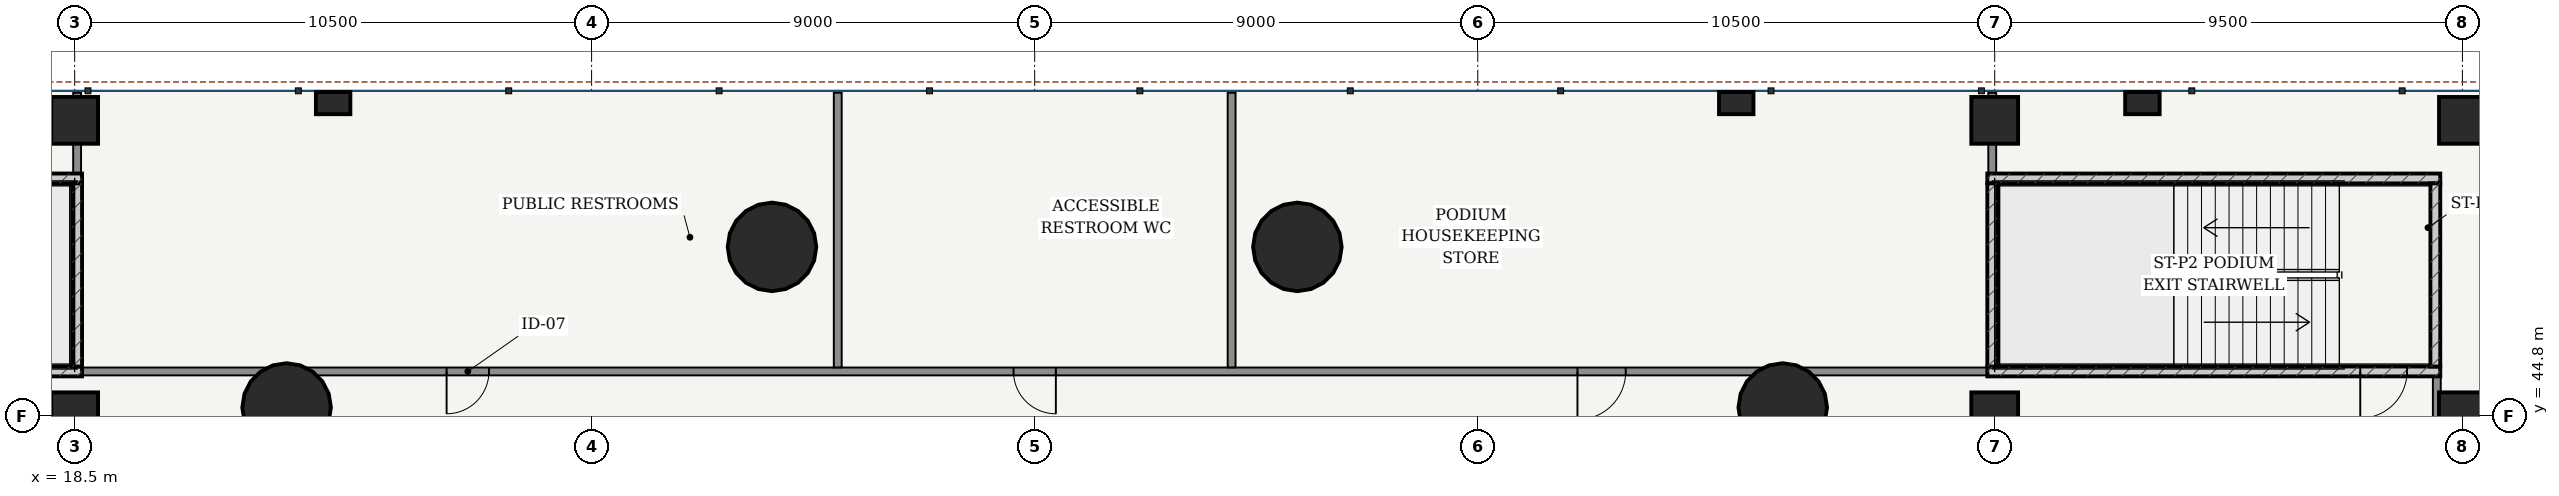
"""IFC4 building model, lengths in metres.
Left out: names, types, materials, properties, quantities, classifications, styles, units other than length and angle.
Written with IfcOpenShell. Run it as: python <this file> out.ifc"""

import sys

from ifc_helpers import new_model, si_unit, direction, frame, frame_2d, origin, origin_2d, place, context, subcontext, project, spatial, rectangle, hollow_circle, extrude, source, transform, mapped, element, fill, save


model = new_model("IFC4")
c1 = context("Model", 3, precision=1e-05, world=origin(), true_north=direction((-0.2419218956, 0.970295726276)))
c2 = subcontext(c1, "Body", "Model", "MODEL_VIEW")
j1 = project(units=[si_unit("LENGTHUNIT", "METRE"), si_unit("PLANEANGLEUNIT", "RADIAN")], contexts=[c1])
p1 = place(None, origin())
s1 = spatial("IfcSite", under=j1, at=p1, CompositionType="ELEMENT")
p2 = place(p1, origin())
s2 = spatial("IfcBuilding", under=s1, at=p2, CompositionType="ELEMENT")
p3 = place(p2, frame((0.0, 0.0, 5.4)))
s3 = spatial("IfcBuildingStorey", under=s2, at=p3, CompositionType="ELEMENT", Elevation=5.4)
p4 = place(p3, frame((9.45, 45.7, 0.0), z_axis=(0.0, 0.0, 1.0), x_axis=(1.0, 0.0, 0.0)))
e1 = element("IfcWall", 1, at=p4, inside=s3, PredefinedType="SOLIDWALL", context=c2, shape_type="SweptSolid", body=[
    extrude(rectangle(XDim=9.2, YDim=0.2, at=frame_2d((4.6, 0.0))), origin(), (0.0, 0.0, 1.0), 4.2),
])
p5 = place(p4, frame((0.675, 0.0, 0.0)))
e2 = element("IfcOpeningElement", 2, at=p5, cuts=e1, PredefinedType="OPENING", context=c2, shape_type="SweptSolid", body=[
    extrude(rectangle(XDim=0.95, YDim=2.15, at=frame_2d((0.475, 1.075))), frame((0.0, 0.11, 0.0), z_axis=(0.0, -1.0, 0.0), x_axis=(1.0, 0.0, 0.0)), (0.0, 0.0, 1.0), 0.22),
])
p6 = place(p3, frame((9.45, 49.62, 0.0), z_axis=(0.0, 0.0, 1.0), x_axis=(1.0, 0.0, 0.0)))
e3 = element("IfcWall", 3, at=p6, inside=s3, PredefinedType="SOLIDWALL", context=c2, shape_type="SweptSolid", body=[
    extrude(rectangle(XDim=9.2, YDim=0.2, at=frame_2d((4.6, 0.0))), origin(), (0.0, 0.0, 1.0), 4.2),
])
p7 = place(p3, frame((18.55, 45.8, 0.0), z_axis=(0.0, 0.0, 1.0), x_axis=(0.0, 1.0, 0.0)))
e4 = element("IfcWall", 4, at=p7, inside=s3, PredefinedType="SOLIDWALL", context=c2, shape_type="SweptSolid", body=[
    extrude(rectangle(XDim=3.72, YDim=0.2, at=frame_2d((1.86, 0.0))), origin(), (0.0, 0.0, 1.0), 4.2),
])
p8 = place(p3, frame((57.35, 45.7, 0.0), z_axis=(0.0, 0.0, 1.0), x_axis=(1.0, 0.0, 0.0)))
e5 = element("IfcWall", 5, at=p8, inside=s3, PredefinedType="SOLIDWALL", context=c2, shape_type="SweptSolid", body=[
    extrude(rectangle(XDim=9.2, YDim=0.2, at=frame_2d((4.6, 0.0))), origin(), (0.0, 0.0, 1.0), 4.2),
])
p9 = place(p8, frame((7.575, 0.0, 0.0)))
e6 = element("IfcOpeningElement", 6, at=p9, cuts=e5, PredefinedType="OPENING", context=c2, shape_type="SweptSolid", body=[
    extrude(rectangle(XDim=0.95, YDim=2.15, at=frame_2d((0.475, 1.075))), frame((0.0, 0.11, 0.0), z_axis=(0.0, -1.0, 0.0), x_axis=(1.0, 0.0, 0.0)), (0.0, 0.0, 1.0), 0.22),
])
p10 = place(p3, frame((57.35, 49.62, 0.0), z_axis=(0.0, 0.0, 1.0), x_axis=(1.0, 0.0, 0.0)))
e7 = element("IfcWall", 7, at=p10, inside=s3, PredefinedType="SOLIDWALL", context=c2, shape_type="SweptSolid", body=[
    extrude(rectangle(XDim=9.2, YDim=0.2, at=frame_2d((4.6, 0.0))), origin(), (0.0, 0.0, 1.0), 4.2),
])
for number, where, z_axis, x_axis in (
    (8, (57.45, 45.8, 0.0), (0.0, 0.0, 1.0), (0.0, 1.0, 0.0)),
    (9, (66.45, 45.8, 0.0), (0.0, 0.0, 1.0), (0.0, 1.0, 0.0)),
):
    element("IfcWall", number, at=place(p3, frame(where, z_axis=z_axis, x_axis=x_axis)), inside=s3, PredefinedType="SOLIDWALL", context=c2, shape_type="SweptSolid", body=[
        extrude(rectangle(XDim=3.72, YDim=0.2, at=frame_2d((1.86, 0.0))), origin(), (0.0, 0.0, 1.0), 4.2),
    ])
for number, where, z_axis, x_axis in (
    (10, (53.195, 44.968, 0.0), (0.0, 0.0, 1.0), (1.0, 0.0, 0.0)),
    (11, (43.336, 48.23, 0.0), (0.0, 0.0, 1.0), (1.0, 0.0, 0.0)),
    (12, (32.664, 48.23, 0.0), (0.0, 0.0, 1.0), (1.0, 0.0, 0.0)),
    (13, (22.805, 44.968, 0.0), (0.0, 0.0, 1.0), (1.0, 0.0, 0.0)),
):
    element("IfcColumn", number, at=place(p3, frame(where, z_axis=z_axis, x_axis=x_axis)), inside=s3, PredefinedType="COLUMN", context=c2, shape_type="SweptSolid", body=[
        extrude(hollow_circle(Radius=0.9, WallThickness=0.055, at=origin_2d()), origin(), (0.0, 0.0, 1.0), 4.5),
    ])
for number, where, z_axis, x_axis in (
    (14, (18.5, 44.8, 0.0), (0.0, 0.0, 1.0), (1.0, 0.0, 0.0)),
    (15, (18.5, 50.8, 0.0), (0.0, 0.0, 1.0), (1.0, 0.0, 0.0)),
    (16, (57.5, 44.8, 0.0), (0.0, 0.0, 1.0), (1.0, 0.0, 0.0)),
    (17, (57.5, 50.8, 0.0), (0.0, 0.0, 1.0), (1.0, 0.0, 0.0)),
    (18, (67.0, 44.8, 0.0), (0.0, 0.0, 1.0), (1.0, 0.0, 0.0)),
    (19, (67.0, 50.8, 0.0), (0.0, 0.0, 1.0), (1.0, 0.0, 0.0)),
):
    element("IfcColumn", number, at=place(p3, frame(where, z_axis=z_axis, x_axis=x_axis)), inside=s3, PredefinedType="COLUMN", context=c2, shape_type="SweptSolid", body=[
        extrude(rectangle(XDim=0.95, YDim=0.95, at=origin_2d()), origin(), (0.0, 0.0, 1.0), 4.5),
    ])
for number, where, z_axis, x_axis in (
    (20, (23.75, 51.15, 0.0), (0.0, 0.0, 1.0), (1.0, 0.0, 0.0)),
    (21, (52.25, 51.15, 0.0), (0.0, 0.0, 1.0), (1.0, 0.0, 0.0)),
    (22, (60.5, 51.15, 0.0), (0.0, 0.0, 1.0), (1.0, 0.0, 0.0)),
):
    element("IfcColumn", number, at=place(p3, frame(where, z_axis=z_axis, x_axis=x_axis)), inside=s3, PredefinedType="PILASTER", context=c2, shape_type="SweptSolid", body=[
        extrude(rectangle(XDim=0.7, YDim=0.45, at=origin_2d()), origin(), (0.0, 0.0, 1.0), 4.5),
    ])
p11 = place(p3, frame((66.48, 36.92, 0.0), z_axis=(0.0, 0.0, 1.0), x_axis=(0.0, 1.0, 0.0)))
e23 = element("IfcWall", 23, at=p11, inside=s3, PredefinedType="PARTITIONING", context=c2, shape_type="SweptSolid", body=[
    extrude(rectangle(XDim=8.78, YDim=0.16, at=frame_2d((4.39, 0.0))), origin(), (0.0, 0.0, 1.0), 3.569),
])
p12 = place(p3, frame((18.55, 45.7, 0.0), z_axis=(0.0, 0.0, 1.0), x_axis=(1.0, 0.0, 0.0)))
e24 = element("IfcWall", 24, at=p12, inside=s3, PredefinedType="PARTITIONING", context=c2, shape_type="SweptSolid", body=[
    extrude(rectangle(XDim=38.9, YDim=0.16, at=frame_2d((19.45, 0.0))), origin(), (0.0, 0.0, 1.0), 3.55),
])
p13 = place(p12, frame((7.505, 0.0, 0.0)))
e25 = element("IfcOpeningElement", 25, at=p13, cuts=e24, PredefinedType="OPENING", context=c2, shape_type="SweptSolid", body=[
    extrude(rectangle(XDim=0.86, YDim=2.1, at=frame_2d((0.43, 1.05))), frame((0.0, 0.09, 0.0), z_axis=(0.0, -1.0, 0.0), x_axis=(1.0, 0.0, 0.0)), (0.0, 0.0, 1.0), 0.18),
])
p14 = place(p12, frame((19.02, 0.0, 0.0)))
e26 = element("IfcOpeningElement", 26, at=p14, cuts=e24, PredefinedType="OPENING", context=c2, shape_type="SweptSolid", body=[
    extrude(rectangle(XDim=0.86, YDim=2.1, at=frame_2d((0.43, 1.05))), frame((0.0, 0.09, 0.0), z_axis=(0.0, -1.0, 0.0), x_axis=(1.0, 0.0, 0.0)), (0.0, 0.0, 1.0), 0.18),
])
p15 = place(p12, frame((30.475, 0.0, 0.0)))
e27 = element("IfcOpeningElement", 27, at=p15, cuts=e24, PredefinedType="OPENING", context=c2, shape_type="SweptSolid", body=[
    extrude(rectangle(XDim=0.98, YDim=2.2, at=frame_2d((0.49, 1.1))), frame((0.0, 0.09, 0.0), z_axis=(0.0, -1.0, 0.0), x_axis=(1.0, 0.0, 0.0)), (0.0, 0.0, 1.0), 0.18),
])
for number, where, z_axis, x_axis in (
    (28, (34.0, 45.782, 0.0), (0.0, 0.0, 1.0), (0.0, 1.0, 0.0)),
    (29, (42.0, 45.782, 0.0), (0.0, 0.0, 1.0), (0.0, 1.0, 0.0)),
):
    element("IfcWall", number, at=place(p3, frame(where, z_axis=z_axis, x_axis=x_axis)), inside=s3, PredefinedType="PARTITIONING", context=c2, shape_type="SweptSolid", body=[
        extrude(rectangle(XDim=5.578, YDim=0.16, at=frame_2d((2.789, 0.0))), origin(), (0.0, 0.0, 1.0), 3.642),
    ])
for number, where, z_axis, x_axis in (
    (30, (18.55, 49.722, 0.0), (0.0, 0.0, 1.0), (0.0, 1.0, 0.0)),
    (31, (57.45, 49.722, 0.0), (0.0, 0.0, 1.0), (0.0, 1.0, 0.0)),
):
    element("IfcWall", number, at=place(p3, frame(where, z_axis=z_axis, x_axis=x_axis)), inside=s3, PredefinedType="PARTITIONING", context=c2, shape_type="SweptSolid", body=[
        extrude(rectangle(XDim=1.638, YDim=0.16, at=frame_2d((0.819, 0.0))), origin(), (0.0, 0.0, 1.0), 3.235),
    ])
m1 = source(origin(), c2, "Body", "SweptSolid", [
    extrude(rectangle(XDim=0.95, YDim=2.15, at=frame_2d((0.475, 1.075))), frame((0.0, 0.025, 0.0), z_axis=(0.0, -1.0, 0.0), x_axis=(1.0, 0.0, 0.0)), (0.0, 0.0, 1.0), 0.05),
])
p16 = place(p9, frame((0.95, 0.0, 0.0), z_axis=(0.0, 0.0, 1.0), x_axis=(-1.0, 0.0, 0.0)))
e32 = element("IfcDoor", 32, at=p16, inside=s3, OperationType="SINGLE_SWING_RIGHT", PredefinedType="DOOR", context=c2, shape_type="MappedRepresentation", body=[
    mapped(m1, transform((0.0, 0.0, 0.0), scale=1.0)),
])
fill(e6, e32)
m2 = source(origin(), c2, "Body", "SweptSolid", [
    extrude(rectangle(XDim=0.86, YDim=2.1, at=frame_2d((0.43, 1.05))), frame((0.0, 0.025, 0.0), z_axis=(0.0, -1.0, 0.0), x_axis=(1.0, 0.0, 0.0)), (0.0, 0.0, 1.0), 0.05),
])
p17 = place(p13, frame((0.86, 0.0, 0.0), z_axis=(0.0, 0.0, 1.0), x_axis=(-1.0, 0.0, 0.0)))
e33 = element("IfcDoor", 33, at=p17, inside=s3, OperationType="SINGLE_SWING_RIGHT", PredefinedType="DOOR", context=c2, shape_type="MappedRepresentation", body=[
    mapped(m2, transform((0.0, 0.0, 0.0), scale=1.0)),
])
fill(e25, e33)
p18 = place(p14, frame((0.86, 0.0, 0.0), z_axis=(0.0, 0.0, 1.0), x_axis=(-1.0, 0.0, 0.0)))
e34 = element("IfcDoor", 34, at=p18, inside=s3, OperationType="SINGLE_SWING_LEFT", PredefinedType="DOOR", context=c2, shape_type="MappedRepresentation", body=[
    mapped(m2, transform((0.0, 0.0, 0.0), scale=1.0)),
])
fill(e26, e34)
m3 = source(origin(), c2, "Body", "SweptSolid", [
    extrude(rectangle(XDim=0.98, YDim=2.2, at=frame_2d((0.49, 1.1))), frame((0.0, 0.025, 0.0), z_axis=(0.0, -1.0, 0.0), x_axis=(1.0, 0.0, 0.0)), (0.0, 0.0, 1.0), 0.05),
])
p19 = place(p15, frame((0.98, 0.0, 0.0), z_axis=(0.0, 0.0, 1.0), x_axis=(-1.0, 0.0, 0.0)))
e35 = element("IfcDoor", 35, at=p19, inside=s3, OperationType="SINGLE_SWING_RIGHT", PredefinedType="DOOR", context=c2, shape_type="MappedRepresentation", body=[
    mapped(m3, transform((0.0, 0.0, 0.0), scale=1.0)),
])
fill(e27, e35)
save(model, sys.argv[1])
